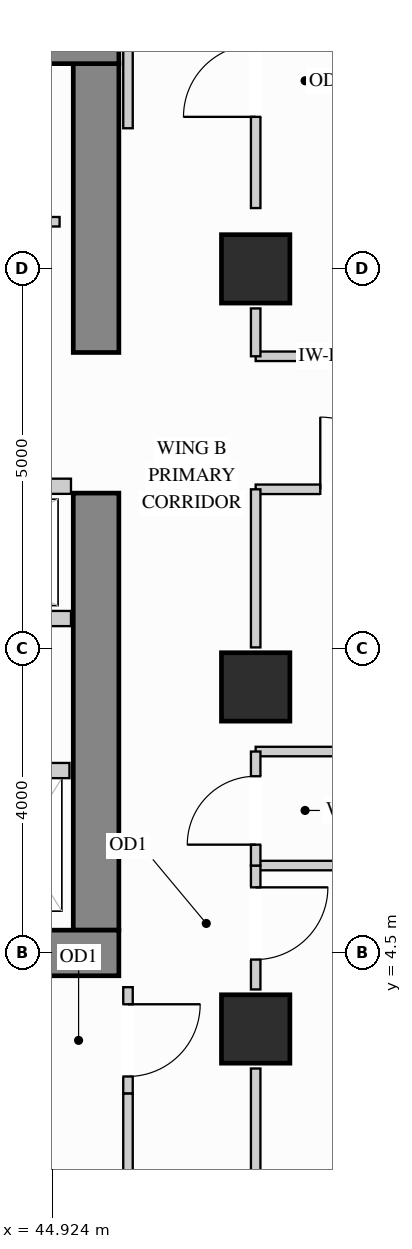
"""IFC4 building model, lengths in metres.
Left out: names, types, materials, properties, quantities, classifications, styles, units other than length and angle.
Written with IfcOpenShell. Run it as: python <this file> out.ifc"""

import sys

from ifc_helpers import new_model, si_unit, direction, frame, frame_2d, origin, origin_2d, place, context, subcontext, project, spatial, rectangle, extrude, source, transform, mapped, element, fill, save


model = new_model("IFC4")
c1 = context("Model", 3, precision=1e-05, world=origin(), true_north=direction((0.0, 1.0)))
c2 = subcontext(c1, "Body", "Model", "MODEL_VIEW")
j1 = project(units=[si_unit("LENGTHUNIT", "METRE"), si_unit("PLANEANGLEUNIT", "RADIAN")], contexts=[c1])
p1 = place(None, origin())
s1 = spatial("IfcSite", under=j1, at=p1, CompositionType="ELEMENT")
p2 = place(p1, origin())
s2 = spatial("IfcBuilding", under=s1, at=p2, CompositionType="ELEMENT")
p3 = place(p2, frame((0.0, 0.0, 186.3)))
s3 = spatial("IfcBuildingStorey", under=s2, at=p3, CompositionType="ELEMENT", Elevation=186.3)
m1 = source(origin(), c2, "Body", "SweptSolid", [
    extrude(rectangle(XDim=0.9, YDim=0.9, at=origin_2d()), origin(), (0.0, 0.0, 1.0), 3.4),
])
for number, where, z_axis, x_axis in (
    (1, (47.6, 13.5, 0.0), (0.0, 0.0, 1.0), (1.0, 0.0, 0.0)),
    (2, (47.6, 3.5, 0.0), (0.0, 0.0, 1.0), (1.0, 0.0, 0.0)),
    (3, (47.6, 8.0, 0.0), (0.0, 0.0, 1.0), (1.0, 0.0, 0.0)),
):
    element("IfcColumn", number, at=place(p3, frame(where, z_axis=z_axis, x_axis=x_axis)), inside=s3, PredefinedType="COLUMN", context=c2, shape_type="MappedRepresentation", body=[
        mapped(m1, transform((0.0, 0.0, 0.0), x_axis=(1.0, 0.0, 0.0), y_axis=(0.0, 1.0, 0.0), z_axis=(0.0, 0.0, 1.0))),
    ])
m2 = source(origin(), c2, "Body", "SweptSolid", [
    extrude(rectangle(XDim=5.75, YDim=0.6, at=frame_2d((2.875, 0.0))), origin(), (0.0, 0.0, 1.0), 3.4),
])
p4 = place(p3, frame((45.5, 4.8, 0.0), z_axis=(0.0, 0.0, 1.0), x_axis=(0.0, 1.0, 0.0)))
e4 = element("IfcWall", 4, at=p4, inside=s3, PredefinedType="SHEAR", context=c2, shape_type="MappedRepresentation", body=[
    mapped(m2, transform((0.0, 0.0, 0.0), x_axis=(1.0, 0.0, 0.0), y_axis=(0.0, 1.0, 0.0), z_axis=(0.0, 0.0, 1.0))),
])
m3 = source(origin(), c2, "Body", "SweptSolid", [
    extrude(rectangle(XDim=3.8, YDim=0.6, at=frame_2d((1.9, 0.0))), origin(), (0.0, 0.0, 1.0), 3.4),
])
p5 = place(p3, frame((45.5, 12.4, 0.0), z_axis=(0.0, 0.0, 1.0), x_axis=(0.0, 1.0, 0.0)))
e5 = element("IfcWall", 5, at=p5, inside=s3, PredefinedType="SHEAR", context=c2, shape_type="MappedRepresentation", body=[
    mapped(m3, transform((0.0, 0.0, 0.0), x_axis=(1.0, 0.0, 0.0), y_axis=(0.0, 1.0, 0.0), z_axis=(0.0, 0.0, 1.0))),
])
m4 = source(origin(), c2, "Body", "SweptSolid", [
    extrude(rectangle(XDim=10.1, YDim=0.6, at=frame_2d((5.05, 0.0))), origin(), (0.0, 0.0, 1.0), 3.4),
])
for number, where, z_axis, x_axis in (
    (6, (35.7, 16.5, 0.0), (0.0, 0.0, 1.0), (1.0, 0.0, 0.0)),
    (7, (35.7, 4.5, 0.0), (0.0, 0.0, 1.0), (1.0, 0.0, 0.0)),
):
    element("IfcWall", number, at=place(p3, frame(where, z_axis=z_axis, x_axis=x_axis)), inside=s3, PredefinedType="SHEAR", context=c2, shape_type="MappedRepresentation", body=[
        mapped(m4, transform((0.0, 0.0, 0.0), x_axis=(1.0, 0.0, 0.0), y_axis=(0.0, 1.0, 0.0), z_axis=(0.0, 0.0, 1.0))),
    ])
p6 = place(p3, frame((41.8, 14.12, 0.0), z_axis=(0.0, 0.0, 1.0), x_axis=(1.0, 0.0, 0.0)))
e8 = element("IfcWall", 8, at=p6, inside=s3, PredefinedType="PARTITIONING", context=c2, shape_type="SweptSolid", body=[
    extrude(rectangle(XDim=3.22, YDim=0.125, at=frame_2d((1.61, 0.0))), origin(), (0.0, 0.0, 1.0), 3.385),
])
p7 = place(p6, frame((1.135, 0.0, 0.0)))
e9 = element("IfcOpeningElement", 9, at=p7, cuts=e8, PredefinedType="OPENING", context=c2, shape_type="SweptSolid", body=[
    extrude(rectangle(XDim=0.85, YDim=2.1, at=frame_2d((0.425, 1.05))), frame((0.0, 0.073, 0.0), z_axis=(0.0, -1.0, 0.0), x_axis=(1.0, 0.0, 0.0)), (0.0, 0.0, 1.0), 0.145),
])
m5 = source(origin(), c2, "Body", "SweptSolid", [
    extrude(rectangle(XDim=5.048, YDim=0.125, at=frame_2d((2.524, 0.0))), origin(), (0.0, 0.0, 1.0), 3.385),
])
for number, where, z_axis, x_axis in (
    (10, (47.6, 5.65, 0.0), (0.0, 0.0, 1.0), (1.0, 0.0, 0.0)),
    (11, (47.6, 7.15, 0.0), (0.0, 0.0, 1.0), (1.0, 0.0, 0.0)),
):
    element("IfcWall", number, at=place(p3, frame(where, z_axis=z_axis, x_axis=x_axis)), inside=s3, PredefinedType="PARTITIONING", context=c2, shape_type="MappedRepresentation", body=[
        mapped(m5, transform((0.0, 0.0, 0.0), x_axis=(1.0, 0.0, 0.0), y_axis=(0.0, 1.0, 0.0), z_axis=(0.0, 0.0, 1.0))),
    ])
m6 = source(origin(), c2, "Body", "SweptSolid", [
    extrude(rectangle(XDim=2.65, YDim=0.125, at=frame_2d((1.325, 0.0))), origin(), (0.0, 0.0, 1.0), 3.385),
])
p8 = place(p3, frame((47.6, 12.35, 0.0), z_axis=(0.0, 0.0, 1.0), x_axis=(1.0, 0.0, 0.0)))
e12 = element("IfcWall", 12, at=p8, inside=s3, PredefinedType="PARTITIONING", context=c2, shape_type="MappedRepresentation", body=[
    mapped(m6, transform((0.0, 0.0, 0.0), x_axis=(1.0, 0.0, 0.0), y_axis=(0.0, 1.0, 0.0), z_axis=(0.0, 0.0, 1.0))),
])
p9 = place(p3, frame((47.6, 10.6, 0.0), z_axis=(0.0, 0.0, 1.0), x_axis=(1.0, 0.0, 0.0)))
e13 = element("IfcWall", 13, at=p9, inside=s3, PredefinedType="PARTITIONING", context=c2, shape_type="SweptSolid", body=[
    extrude(rectangle(XDim=2.65, YDim=0.125, at=frame_2d((1.325, 0.0))), origin(), (0.0, 0.0, 1.0), 2.773),
])
p10 = place(p9, frame((0.85, 0.0, 0.0)))
e14 = element("IfcOpeningElement", 14, at=p10, cuts=e13, PredefinedType="OPENING", context=c2, shape_type="SweptSolid", body=[
    extrude(rectangle(XDim=0.95, YDim=2.15, at=frame_2d((0.475, 1.075))), frame((0.0, 0.073, 0.0), z_axis=(0.0, -1.0, 0.0), x_axis=(1.0, 0.0, 0.0)), (0.0, 0.0, 1.0), 0.145),
])
p11 = place(p3, frame((47.6, 4.02, 0.0), z_axis=(0.0, 0.0, 1.0), x_axis=(0.0, 1.0, 0.0)))
e15 = element("IfcWall", 15, at=p11, inside=s3, PredefinedType="PARTITIONING", context=c2, shape_type="SweptSolid", body=[
    extrude(rectangle(XDim=1.63, YDim=0.125, at=frame_2d((0.815, 0.0))), origin(), (0.0, 0.0, 1.0), 2.773),
])
p12 = place(p11, frame((0.393, 0.0, 0.0)))
e16 = element("IfcOpeningElement", 16, at=p12, cuts=e15, PredefinedType="OPENING", context=c2, shape_type="SweptSolid", body=[
    extrude(rectangle(XDim=0.95, YDim=2.15, at=frame_2d((0.475, 1.075))), frame((0.0, 0.073, 0.0), z_axis=(0.0, -1.0, 0.0), x_axis=(1.0, 0.0, 0.0)), (0.0, 0.0, 1.0), 0.145),
])
m7 = source(origin(), c2, "Body", "SweptSolid", [
    extrude(rectangle(XDim=1.86, YDim=0.125, at=frame_2d((0.93, 0.0))), origin(), (0.0, 0.0, 1.0), 2.773),
])
p13 = place(p3, frame((47.6, 1.12, 0.0), z_axis=(0.0, 0.0, 1.0), x_axis=(0.0, 1.0, 0.0)))
e17 = element("IfcWall", 17, at=p13, inside=s3, PredefinedType="PARTITIONING", context=c2, shape_type="MappedRepresentation", body=[
    mapped(m7, transform((0.0, 0.0, 0.0), x_axis=(1.0, 0.0, 0.0), y_axis=(0.0, 1.0, 0.0), z_axis=(0.0, 0.0, 1.0))),
])
m8 = source(origin(), c2, "Body", "SweptSolid", [
    extrude(rectangle(XDim=2.08, YDim=0.125, at=frame_2d((1.04, 0.0))), origin(), (0.0, 0.0, 1.0), 2.773),
])
p14 = place(p3, frame((47.6, 8.52, 0.0), z_axis=(0.0, 0.0, 1.0), x_axis=(0.0, 1.0, 0.0)))
e18 = element("IfcWall", 18, at=p14, inside=s3, PredefinedType="PARTITIONING", context=c2, shape_type="MappedRepresentation", body=[
    mapped(m8, transform((0.0, 0.0, 0.0), x_axis=(1.0, 0.0, 0.0), y_axis=(0.0, 1.0, 0.0), z_axis=(0.0, 0.0, 1.0))),
])
p15 = place(p3, frame((47.6, 14.3, 0.0), z_axis=(0.0, 0.0, 1.0), x_axis=(0.0, 1.0, 0.0)))
e19 = element("IfcWall", 19, at=p15, inside=s3, PredefinedType="PARTITIONING", context=c2, shape_type="SweptSolid", body=[
    extrude(rectangle(XDim=2.58, YDim=0.125, at=frame_2d((1.29, 0.0))), origin(), (0.0, 0.0, 1.0), 2.773),
])
p16 = place(p15, frame((1.2, 0.0, 0.0)))
e20 = element("IfcOpeningElement", 20, at=p16, cuts=e19, PredefinedType="OPENING", context=c2, shape_type="SweptSolid", body=[
    extrude(rectangle(XDim=0.95, YDim=2.15, at=frame_2d((0.475, 1.075))), frame((0.0, 0.073, 0.0), z_axis=(0.0, -1.0, 0.0), x_axis=(1.0, 0.0, 0.0)), (0.0, 0.0, 1.0), 0.145),
])
m9 = source(origin(), c2, "Body", "SweptSolid", [
    extrude(rectangle(XDim=0.63, YDim=0.125, at=frame_2d((0.315, 0.0))), origin(), (0.0, 0.0, 1.0), 2.773),
])
p17 = place(p3, frame((47.6, 12.35, 0.0), z_axis=(0.0, 0.0, 1.0), x_axis=(0.0, 1.0, 0.0)))
e21 = element("IfcWall", 21, at=p17, inside=s3, PredefinedType="PARTITIONING", context=c2, shape_type="MappedRepresentation", body=[
    mapped(m9, transform((0.0, 0.0, 0.0), x_axis=(1.0, 0.0, 0.0), y_axis=(0.0, 1.0, 0.0), z_axis=(0.0, 0.0, 1.0))),
])
p18 = place(p3, frame((47.6, 5.65, 0.0), z_axis=(0.0, 0.0, 1.0), x_axis=(0.0, 1.0, 0.0)))
e22 = element("IfcWall", 22, at=p18, inside=s3, PredefinedType="PARTITIONING", context=c2, shape_type="SweptSolid", body=[
    extrude(rectangle(XDim=1.5, YDim=0.125, at=frame_2d((0.75, 0.0))), origin(), (0.0, 0.0, 1.0), 2.773),
])
p19 = place(p18, frame((0.275, 0.0, 0.0)))
e23 = element("IfcOpeningElement", 23, at=p19, cuts=e22, PredefinedType="OPENING", context=c2, shape_type="SweptSolid", body=[
    extrude(rectangle(XDim=0.9, YDim=2.15, at=frame_2d((0.45, 1.075))), frame((0.0, 0.073, 0.0), z_axis=(0.0, -1.0, 0.0), x_axis=(1.0, 0.0, 0.0)), (0.0, 0.0, 1.0), 0.145),
])
m10 = source(origin(), c2, "Body", "SweptSolid", [
    extrude(rectangle(XDim=2.298, YDim=0.125, at=frame_2d((1.149, 0.0))), origin(), (0.0, 0.0, 1.0), 3.385),
])
p20 = place(p3, frame((45.92, 15.35, 0.0), z_axis=(0.0, 0.0, 1.0), x_axis=(0.0, 1.0, 0.0)))
e24 = element("IfcWall", 24, at=p20, inside=s3, PredefinedType="PARTITIONING", context=c2, shape_type="MappedRepresentation", body=[
    mapped(m10, transform((0.0, 0.0, 0.0), x_axis=(1.0, 0.0, 0.0), y_axis=(0.0, 1.0, 0.0), z_axis=(0.0, 0.0, 1.0))),
])
p21 = place(p3, frame((45.92, 2.65, 0.0), z_axis=(0.0, 0.0, 1.0), x_axis=(0.0, 1.0, 0.0)))
e25 = element("IfcWall", 25, at=p21, inside=s3, PredefinedType="PARTITIONING", context=c2, shape_type="SweptSolid", body=[
    extrude(rectangle(XDim=1.4, YDim=0.125, at=frame_2d((0.7, 0.0))), origin(), (0.0, 0.0, 1.0), 3.385),
])
p22 = place(p21, frame((0.225, 0.0, 0.0)))
e26 = element("IfcOpeningElement", 26, at=p22, cuts=e25, PredefinedType="OPENING", context=c2, shape_type="SweptSolid", body=[
    extrude(rectangle(XDim=0.95, YDim=2.15, at=frame_2d((0.475, 1.075))), frame((0.0, 0.073, 0.0), z_axis=(0.0, -1.0, 0.0), x_axis=(1.0, 0.0, 0.0)), (0.0, 0.0, 1.0), 0.145),
])
p23 = place(p3, frame((45.92, 0.352, 0.0), z_axis=(0.0, 0.0, 1.0), x_axis=(0.0, 1.0, 0.0)))
e27 = element("IfcWall", 27, at=p23, inside=s3, PredefinedType="PARTITIONING", context=c2, shape_type="MappedRepresentation", body=[
    mapped(m10, transform((0.0, 0.0, 0.0), x_axis=(1.0, 0.0, 0.0), y_axis=(0.0, 1.0, 0.0), z_axis=(0.0, 0.0, 1.0))),
])
m11 = source(origin(), c2, "Body", "SweptSolid", [
    extrude(rectangle(XDim=1.3, YDim=0.2, at=frame_2d((0.65, 0.0))), origin(), (0.0, 0.0, 1.0), 3.385),
])
p24 = place(p3, frame((43.85, 6.9, 0.0), z_axis=(0.0, 0.0, 1.0), x_axis=(1.0, 0.0, 0.0)))
e28 = element("IfcWall", 28, at=p24, inside=s3, PredefinedType="PARTITIONING", context=c2, shape_type="MappedRepresentation", body=[
    mapped(m11, transform((0.0, 0.0, 0.0), x_axis=(1.0, 0.0, 0.0), y_axis=(0.0, 1.0, 0.0), z_axis=(0.0, 0.0, 1.0))),
])
m12 = source(origin(), c2, "Body", "SweptSolid", [
    extrude(rectangle(XDim=3.49, YDim=0.2, at=frame_2d((1.745, 0.0))), origin(), (0.0, 0.0, 1.0), 3.385),
])
for number, where, z_axis, x_axis in (
    (29, (41.68, 10.64, 0.0), (0.0, 0.0, 1.0), (1.0, 0.0, 0.0)),
    (30, (41.68, 8.9, 0.0), (0.0, 0.0, 1.0), (1.0, 0.0, 0.0)),
):
    element("IfcWall", number, at=place(p3, frame(where, z_axis=z_axis, x_axis=x_axis)), inside=s3, PredefinedType="PARTITIONING", context=c2, shape_type="MappedRepresentation", body=[
        mapped(m12, transform((0.0, 0.0, 0.0), x_axis=(1.0, 0.0, 0.0), y_axis=(0.0, 1.0, 0.0), z_axis=(0.0, 0.0, 1.0))),
    ])
m13 = source(origin(), c2, "Body", "SweptSolid", [
    extrude(rectangle(XDim=0.95, YDim=2.15, at=frame_2d((0.475, 1.075))), frame((0.0, 0.025, 0.0), z_axis=(0.0, -1.0, 0.0), x_axis=(1.0, 0.0, 0.0)), (0.0, 0.0, 1.0), 0.05),
])
p25 = place(p22, origin())
e31 = element("IfcDoor", 31, at=p25, inside=s3, OperationType="SINGLE_SWING_RIGHT", PredefinedType="DOOR", context=c2, shape_type="MappedRepresentation", body=[
    mapped(m13, transform((0.0, 0.0, 0.0), x_axis=(1.0, 0.0, 0.0), y_axis=(0.0, 1.0, 0.0), z_axis=(0.0, 0.0, 1.0))),
])
fill(e26, e31)
p26 = place(p12, origin())
e32 = element("IfcDoor", 32, at=p26, inside=s3, OperationType="SINGLE_SWING_RIGHT", PredefinedType="DOOR", context=c2, shape_type="MappedRepresentation", body=[
    mapped(m13, transform((0.0, 0.0, 0.0), x_axis=(1.0, 0.0, 0.0), y_axis=(0.0, 1.0, 0.0), z_axis=(0.0, 0.0, 1.0))),
])
fill(e16, e32)
p27 = place(p10, origin())
e33 = element("IfcDoor", 33, at=p27, inside=s3, OperationType="SINGLE_SWING_LEFT", PredefinedType="DOOR", context=c2, shape_type="MappedRepresentation", body=[
    mapped(m13, transform((0.0, 0.0, 0.0), x_axis=(1.0, 0.0, 0.0), y_axis=(0.0, 1.0, 0.0), z_axis=(0.0, 0.0, 1.0))),
])
fill(e14, e33)
p28 = place(p16, origin())
e34 = element("IfcDoor", 34, at=p28, inside=s3, OperationType="SINGLE_SWING_LEFT", PredefinedType="DOOR", context=c2, shape_type="MappedRepresentation", body=[
    mapped(m13, transform((0.0, 0.0, 0.0), x_axis=(1.0, 0.0, 0.0), y_axis=(0.0, 1.0, 0.0), z_axis=(0.0, 0.0, 1.0))),
])
fill(e20, e34)
m14 = source(origin(), c2, "Body", "SweptSolid", [
    extrude(rectangle(XDim=0.9, YDim=2.15, at=frame_2d((0.45, 1.075))), frame((0.0, 0.025, 0.0), z_axis=(0.0, -1.0, 0.0), x_axis=(1.0, 0.0, 0.0)), (0.0, 0.0, 1.0), 0.05),
])
p29 = place(p19, origin())
e35 = element("IfcDoor", 35, at=p29, inside=s3, OperationType="SINGLE_SWING_LEFT", PredefinedType="DOOR", context=c2, shape_type="MappedRepresentation", body=[
    mapped(m14, transform((0.0, 0.0, 0.0), x_axis=(1.0, 0.0, 0.0), y_axis=(0.0, 1.0, 0.0), z_axis=(0.0, 0.0, 1.0))),
])
fill(e23, e35)
save(model, sys.argv[1])
